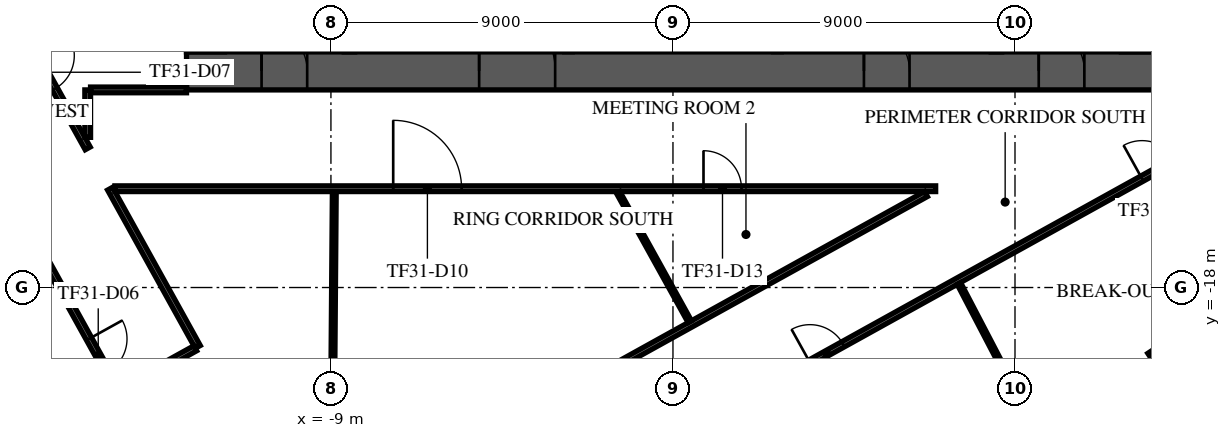
"""IFC4 building model, lengths in metres.
Left out: names, types, materials, properties, quantities, classifications, styles, units other than length and angle.
Written with IfcOpenShell. Run it as: python <this file> out.ifc"""

import sys

from ifc_helpers import new_model, si_unit, direction, frame, frame_2d, origin, origin_2d, place, context, subcontext, project, spatial, rectangle, extrude, element, fill, save


model = new_model("IFC4")
c1 = context("Model", 3, precision=1e-05, world=origin(), true_north=direction((0.0, 1.0)))
c2 = subcontext(c1, "Body", "Model", "MODEL_VIEW")
j1 = project(units=[si_unit("LENGTHUNIT", "METRE"), si_unit("PLANEANGLEUNIT", "RADIAN")], contexts=[c1])
p1 = place(None, origin())
s1 = spatial("IfcSite", under=j1, at=p1, CompositionType="ELEMENT")
p2 = place(p1, origin())
s2 = spatial("IfcBuilding", under=s1, at=p2, CompositionType="ELEMENT")
p3 = place(p2, frame((0.0, 0.0, 139.7)))
s3 = spatial("IfcBuildingStorey", under=s2, at=p3, CompositionType="ELEMENT", Elevation=139.7)
p4 = place(p3, frame((13.258, -19.885, 0.0), z_axis=(0.0, 0.0, 1.0), x_axis=(0.832028680356, 0.55473261583, 0.0)))
e1 = element("IfcColumn", 1, at=p4, inside=s3, PredefinedType="COLUMN", context=c2, shape_type="SweptSolid", body=[
    extrude(rectangle(XDim=1.1, YDim=1.1, at=origin_2d()), origin(), (0.0, 0.0, 1.0), 4.0),
])
p5 = place(p3, frame((-12.8, -12.3, 0.0), z_axis=(0.0, 0.0, 1.0), x_axis=(1.0, 0.0, 0.0)))
e2 = element("IfcWall", 2, at=p5, inside=s3, PredefinedType="SHEAR", context=c2, shape_type="SweptSolid", body=[
    extrude(rectangle(XDim=25.6, YDim=1.0, at=frame_2d((12.8, 0.0))), origin(), (0.0, 0.0, 1.0), 3.6),
])
p6 = place(p5, frame((7.7, 0.0, 0.0)))
e3 = element("IfcOpeningElement", 3, at=p6, cuts=e2, PredefinedType="OPENING", context=c2, shape_type="SweptSolid", body=[
    extrude(rectangle(XDim=2.0, YDim=2.1, at=frame_2d((1.0, 1.05))), frame((0.0, 0.51, 0.0), z_axis=(0.0, -1.0, 0.0), x_axis=(1.0, 0.0, 0.0)), (0.0, 0.0, 1.0), 1.02),
])
p7 = place(p5, frame((17.825, 0.0, 0.0)))
e4 = element("IfcOpeningElement", 4, at=p7, cuts=e2, PredefinedType="OPENING", context=c2, shape_type="SweptSolid", body=[
    extrude(rectangle(XDim=1.2, YDim=2.1, at=frame_2d((0.6, 1.05))), frame((0.0, 0.51, 0.0), z_axis=(0.0, -1.0, 0.0), x_axis=(1.0, 0.0, 0.0)), (0.0, 0.0, 1.0), 1.02),
])
p8 = place(p5, frame((1.975, 0.0, 0.0)))
e5 = element("IfcOpeningElement", 5, at=p8, cuts=e2, PredefinedType="OPENING", context=c2, shape_type="SweptSolid", body=[
    extrude(rectangle(XDim=1.2, YDim=2.1, at=frame_2d((0.6, 1.05))), frame((0.0, 0.51, 0.0), z_axis=(0.0, -1.0, 0.0), x_axis=(1.0, 0.0, 0.0)), (0.0, 0.0, 1.0), 1.02),
])
p9 = place(p5, frame((22.425, 0.0, 0.0)))
e6 = element("IfcOpeningElement", 6, at=p9, cuts=e2, PredefinedType="OPENING", context=c2, shape_type="SweptSolid", body=[
    extrude(rectangle(XDim=1.2, YDim=2.1, at=frame_2d((0.6, 1.05))), frame((0.0, 0.51, 0.0), z_axis=(0.0, -1.0, 0.0), x_axis=(1.0, 0.0, 0.0)), (0.0, 0.0, 1.0), 1.02),
])
p10 = place(p3, frame((-36.291, 4.209, 0.0), z_axis=(0.0, 0.0, 1.0), x_axis=(0.484810659622, -0.874619131003, 0.0)))
e7 = element("IfcWall", 7, at=p10, inside=s3, PredefinedType="STANDARD", context=c2, shape_type="SweptSolid", body=[
    extrude(rectangle(XDim=42.552, YDim=0.6, at=frame_2d((21.276, 0.0))), origin(), (0.0, 0.0, 1.0), 3.6),
])
p11 = place(p10, frame((1.178, 0.0, 0.9)))
e8 = element("IfcOpeningElement", 8, at=p11, cuts=e7, PredefinedType="OPENING", context=c2, shape_type="SweptSolid", body=[
    extrude(rectangle(XDim=1.8, YDim=2.1, at=frame_2d((0.9, 1.05))), frame((0.0, 0.31, 0.0), z_axis=(0.0, -1.0, 0.0), x_axis=(1.0, 0.0, 0.0)), (0.0, 0.0, 1.0), 0.62),
])
p12 = place(p10, frame((5.396, 0.0, 0.9)))
e9 = element("IfcOpeningElement", 9, at=p12, cuts=e7, PredefinedType="OPENING", context=c2, shape_type="SweptSolid", body=[
    extrude(rectangle(XDim=1.8, YDim=2.1, at=frame_2d((0.9, 1.05))), frame((0.0, 0.31, 0.0), z_axis=(0.0, -1.0, 0.0), x_axis=(1.0, 0.0, 0.0)), (0.0, 0.0, 1.0), 0.62),
])
p13 = place(p10, frame((13.956, 0.0, 0.9)))
e10 = element("IfcOpeningElement", 10, at=p13, cuts=e7, PredefinedType="OPENING", context=c2, shape_type="SweptSolid", body=[
    extrude(rectangle(XDim=1.8, YDim=2.1, at=frame_2d((0.9, 1.05))), frame((0.0, 0.31, 0.0), z_axis=(0.0, -1.0, 0.0), x_axis=(1.0, 0.0, 0.0)), (0.0, 0.0, 1.0), 0.62),
])
p14 = place(p10, frame((18.236, 0.0, 0.9)))
e11 = element("IfcOpeningElement", 11, at=p14, cuts=e7, PredefinedType="OPENING", context=c2, shape_type="SweptSolid", body=[
    extrude(rectangle(XDim=1.8, YDim=2.1, at=frame_2d((0.9, 1.05))), frame((0.0, 0.31, 0.0), z_axis=(0.0, -1.0, 0.0), x_axis=(1.0, 0.0, 0.0)), (0.0, 0.0, 1.0), 0.62),
])
p15 = place(p10, frame((22.516, 0.0, 0.9)))
e12 = element("IfcOpeningElement", 12, at=p15, cuts=e7, PredefinedType="OPENING", context=c2, shape_type="SweptSolid", body=[
    extrude(rectangle(XDim=1.8, YDim=2.1, at=frame_2d((0.9, 1.05))), frame((0.0, 0.31, 0.0), z_axis=(0.0, -1.0, 0.0), x_axis=(1.0, 0.0, 0.0)), (0.0, 0.0, 1.0), 0.62),
])
p16 = place(p10, frame((26.796, 0.0, 0.9)))
e13 = element("IfcOpeningElement", 13, at=p16, cuts=e7, PredefinedType="OPENING", context=c2, shape_type="SweptSolid", body=[
    extrude(rectangle(XDim=1.8, YDim=2.1, at=frame_2d((0.9, 1.05))), frame((0.0, 0.31, 0.0), z_axis=(0.0, -1.0, 0.0), x_axis=(1.0, 0.0, 0.0)), (0.0, 0.0, 1.0), 0.62),
])
p17 = place(p10, frame((31.076, 0.0, 0.9)))
e14 = element("IfcOpeningElement", 14, at=p17, cuts=e7, PredefinedType="OPENING", context=c2, shape_type="SweptSolid", body=[
    extrude(rectangle(XDim=1.8, YDim=2.1, at=frame_2d((0.9, 1.05))), frame((0.0, 0.31, 0.0), z_axis=(0.0, -1.0, 0.0), x_axis=(1.0, 0.0, 0.0)), (0.0, 0.0, 1.0), 0.62),
])
p18 = place(p10, frame((35.356, 0.0, 0.9)))
e15 = element("IfcOpeningElement", 15, at=p18, cuts=e7, PredefinedType="OPENING", context=c2, shape_type="SweptSolid", body=[
    extrude(rectangle(XDim=1.8, YDim=2.1, at=frame_2d((0.9, 1.05))), frame((0.0, 0.31, 0.0), z_axis=(0.0, -1.0, 0.0), x_axis=(1.0, 0.0, 0.0)), (0.0, 0.0, 1.0), 0.62),
])
p19 = place(p10, frame((39.573, 0.0, 0.9)))
e16 = element("IfcOpeningElement", 16, at=p19, cuts=e7, PredefinedType="OPENING", context=c2, shape_type="SweptSolid", body=[
    extrude(rectangle(XDim=1.8, YDim=2.1, at=frame_2d((0.9, 1.05))), frame((0.0, 0.31, 0.0), z_axis=(0.0, -1.0, 0.0), x_axis=(1.0, 0.0, 0.0)), (0.0, 0.0, 1.0), 0.62),
])
p20 = place(p3, frame((-9.103, -34.888, 0.0), z_axis=(0.0, 0.0, 1.0), x_axis=(0.874618897425, 0.484811081007, 0.0)))
e17 = element("IfcWall", 17, at=p20, inside=s3, PredefinedType="STANDARD", context=c2, shape_type="SweptSolid", body=[
    extrude(rectangle(XDim=49.751, YDim=0.6, at=frame_2d((24.876, 0.0))), origin(), (0.0, 0.0, 1.0), 3.6),
])
p21 = place(p20, frame((1.161, 0.0, 0.9)))
e18 = element("IfcOpeningElement", 18, at=p21, cuts=e17, PredefinedType="OPENING", context=c2, shape_type="SweptSolid", body=[
    extrude(rectangle(XDim=2.1, YDim=2.1, at=frame_2d((1.05, 1.05))), frame((0.0, 0.31, 0.0), z_axis=(0.0, -1.0, 0.0), x_axis=(1.0, 0.0, 0.0)), (0.0, 0.0, 1.0), 0.62),
])
p22 = place(p20, frame((5.644, 0.0, 0.9)))
e19 = element("IfcOpeningElement", 19, at=p22, cuts=e17, PredefinedType="OPENING", context=c2, shape_type="SweptSolid", body=[
    extrude(rectangle(XDim=2.1, YDim=2.1, at=frame_2d((1.05, 1.05))), frame((0.0, 0.31, 0.0), z_axis=(0.0, -1.0, 0.0), x_axis=(1.0, 0.0, 0.0)), (0.0, 0.0, 1.0), 0.62),
])
p23 = place(p20, frame((10.189, 0.0, 0.9)))
e20 = element("IfcOpeningElement", 20, at=p23, cuts=e17, PredefinedType="OPENING", context=c2, shape_type="SweptSolid", body=[
    extrude(rectangle(XDim=2.1, YDim=2.1, at=frame_2d((1.05, 1.05))), frame((0.0, 0.31, 0.0), z_axis=(0.0, -1.0, 0.0), x_axis=(1.0, 0.0, 0.0)), (0.0, 0.0, 1.0), 0.62),
])
p24 = place(p20, frame((14.735, 0.0, 0.9)))
e21 = element("IfcOpeningElement", 21, at=p24, cuts=e17, PredefinedType="OPENING", context=c2, shape_type="SweptSolid", body=[
    extrude(rectangle(XDim=2.1, YDim=2.1, at=frame_2d((1.05, 1.05))), frame((0.0, 0.31, 0.0), z_axis=(0.0, -1.0, 0.0), x_axis=(1.0, 0.0, 0.0)), (0.0, 0.0, 1.0), 0.62),
])
p25 = place(p20, frame((19.28, 0.0, 0.9)))
e22 = element("IfcOpeningElement", 22, at=p25, cuts=e17, PredefinedType="OPENING", context=c2, shape_type="SweptSolid", body=[
    extrude(rectangle(XDim=2.1, YDim=2.1, at=frame_2d((1.05, 1.05))), frame((0.0, 0.31, 0.0), z_axis=(0.0, -1.0, 0.0), x_axis=(1.0, 0.0, 0.0)), (0.0, 0.0, 1.0), 0.62),
])
p26 = place(p20, frame((23.826, 0.0, 0.9)))
e23 = element("IfcOpeningElement", 23, at=p26, cuts=e17, PredefinedType="OPENING", context=c2, shape_type="SweptSolid", body=[
    extrude(rectangle(XDim=2.1, YDim=2.1, at=frame_2d((1.05, 1.05))), frame((0.0, 0.31, 0.0), z_axis=(0.0, -1.0, 0.0), x_axis=(1.0, 0.0, 0.0)), (0.0, 0.0, 1.0), 0.62),
])
p27 = place(p20, frame((28.371, 0.0, 0.9)))
e24 = element("IfcOpeningElement", 24, at=p27, cuts=e17, PredefinedType="OPENING", context=c2, shape_type="SweptSolid", body=[
    extrude(rectangle(XDim=2.1, YDim=2.1, at=frame_2d((1.05, 1.05))), frame((0.0, 0.31, 0.0), z_axis=(0.0, -1.0, 0.0), x_axis=(1.0, 0.0, 0.0)), (0.0, 0.0, 1.0), 0.62),
])
p28 = place(p20, frame((32.917, 0.0, 0.9)))
e25 = element("IfcOpeningElement", 25, at=p28, cuts=e17, PredefinedType="OPENING", context=c2, shape_type="SweptSolid", body=[
    extrude(rectangle(XDim=2.1, YDim=2.1, at=frame_2d((1.05, 1.05))), frame((0.0, 0.31, 0.0), z_axis=(0.0, -1.0, 0.0), x_axis=(1.0, 0.0, 0.0)), (0.0, 0.0, 1.0), 0.62),
])
p29 = place(p20, frame((37.462, 0.0, 0.9)))
e26 = element("IfcOpeningElement", 26, at=p29, cuts=e17, PredefinedType="OPENING", context=c2, shape_type="SweptSolid", body=[
    extrude(rectangle(XDim=2.1, YDim=2.1, at=frame_2d((1.05, 1.05))), frame((0.0, 0.31, 0.0), z_axis=(0.0, -1.0, 0.0), x_axis=(1.0, 0.0, 0.0)), (0.0, 0.0, 1.0), 0.62),
])
p30 = place(p20, frame((42.008, 0.0, 0.9)))
e27 = element("IfcOpeningElement", 27, at=p30, cuts=e17, PredefinedType="OPENING", context=c2, shape_type="SweptSolid", body=[
    extrude(rectangle(XDim=2.1, YDim=2.1, at=frame_2d((1.05, 1.05))), frame((0.0, 0.31, 0.0), z_axis=(0.0, -1.0, 0.0), x_axis=(1.0, 0.0, 0.0)), (0.0, 0.0, 1.0), 0.62),
])
p31 = place(p20, frame((46.491, 0.0, 0.9)))
e28 = element("IfcOpeningElement", 28, at=p31, cuts=e17, PredefinedType="OPENING", context=c2, shape_type="SweptSolid", body=[
    extrude(rectangle(XDim=2.1, YDim=2.1, at=frame_2d((1.05, 1.05))), frame((0.0, 0.31, 0.0), z_axis=(0.0, -1.0, 0.0), x_axis=(1.0, 0.0, 0.0)), (0.0, 0.0, 1.0), 0.62),
])
p32 = place(p3, frame((-25.279, -1.467, 0.0), z_axis=(0.0, 0.0, 1.0), x_axis=(0.484803020703, -0.874623365294, 0.0)))
e29 = element("IfcWall", 29, at=p32, inside=s3, PredefinedType="PARTITIONING", context=c2, shape_type="SweptSolid", body=[
    extrude(rectangle(XDim=22.02, YDim=0.15, at=frame_2d((11.01, 0.0))), origin(), (0.0, 0.0, 1.0), 3.15),
])
p33 = place(p32, frame((6.3, 0.0, 0.0)))
e30 = element("IfcOpeningElement", 30, at=p33, cuts=e29, PredefinedType="OPENING", context=c2, shape_type="SweptSolid", body=[
    extrude(rectangle(XDim=1.8, YDim=2.1, at=frame_2d((0.9, 1.05))), frame((0.0, 0.085, 0.0), z_axis=(0.0, -1.0, 0.0), x_axis=(1.0, 0.0, 0.0)), (0.0, 0.0, 1.0), 0.17),
])
p34 = place(p32, frame((9.948, 0.0, 0.0)))
e31 = element("IfcOpeningElement", 31, at=p34, cuts=e29, PredefinedType="OPENING", context=c2, shape_type="SweptSolid", body=[
    extrude(rectangle(XDim=1.8, YDim=2.1, at=frame_2d((0.9, 1.05))), frame((0.0, 0.085, 0.0), z_axis=(0.0, -1.0, 0.0), x_axis=(1.0, 0.0, 0.0)), (0.0, 0.0, 1.0), 0.17),
])
p35 = place(p32, frame((20.448, 0.0, 0.0)))
e32 = element("IfcOpeningElement", 32, at=p35, cuts=e29, PredefinedType="OPENING", context=c2, shape_type="SweptSolid", body=[
    extrude(rectangle(XDim=1.0, YDim=2.1, at=frame_2d((0.5, 1.05))), frame((0.0, 0.085, 0.0), z_axis=(0.0, -1.0, 0.0), x_axis=(1.0, 0.0, 0.0)), (0.0, 0.0, 1.0), 0.17),
])
p36 = place(p3, frame((-18.959, -7.918, 0.0), z_axis=(0.0, 0.0, 1.0), x_axis=(0.484857684507, -0.874593062958, 0.0)))
e33 = element("IfcWall", 33, at=p36, inside=s3, PredefinedType="PARTITIONING", context=c2, shape_type="SweptSolid", body=[
    extrude(rectangle(XDim=7.341, YDim=0.15, at=frame_2d((3.67, 0.0))), origin(), (0.0, 0.0, 1.0), 3.15),
])
p37 = place(p36, frame((4.55, 0.0, 0.0)))
e34 = element("IfcOpeningElement", 34, at=p37, cuts=e33, PredefinedType="OPENING", context=c2, shape_type="SweptSolid", body=[
    extrude(rectangle(XDim=1.0, YDim=2.1, at=frame_2d((0.5, 1.05))), frame((0.0, 0.085, 0.0), z_axis=(0.0, -1.0, 0.0), x_axis=(1.0, 0.0, 0.0)), (0.0, 0.0, 1.0), 0.17),
])
p38 = place(p3, frame((-15.4, -14.048, 0.0), z_axis=(0.0, 0.0, 1.0), x_axis=(0.0, 1.0, 0.0)))
e35 = element("IfcWall", 35, at=p38, inside=s3, PredefinedType="PARTITIONING", context=c2, shape_type="SweptSolid", body=[
    extrude(rectangle(XDim=1.248, YDim=0.15, at=frame_2d((0.624, 0.0))), origin(), (0.0, 0.0, 1.0), 3.15),
])
p39 = place(p3, frame((-15.325, -12.8, 0.0), z_axis=(0.0, 0.0, 1.0), x_axis=(1.0, 0.0, 0.0)))
e36 = element("IfcWall", 36, at=p39, inside=s3, PredefinedType="PARTITIONING", context=c2, shape_type="SweptSolid", body=[
    extrude(rectangle(XDim=2.525, YDim=0.15, at=frame_2d((1.262, 0.0))), origin(), (0.0, 0.0, 1.0), 3.03),
])
p40 = place(p3, frame((-14.811, -15.4, 0.0), z_axis=(0.0, 0.0, 1.0), x_axis=(0.484728084089, -0.874664898401, 0.0)))
e37 = element("IfcWall", 37, at=p40, inside=s3, PredefinedType="PARTITIONING", context=c2, shape_type="SweptSolid", body=[
    extrude(rectangle(XDim=4.76, YDim=0.15, at=frame_2d((2.38, 0.0))), origin(), (0.0, 0.0, 1.0), 3.15),
])
p41 = place(p3, frame((-14.684, -15.4, 0.0), z_axis=(0.0, 0.0, 1.0), x_axis=(1.0, 0.0, 0.0)))
e38 = element("IfcWall", 38, at=p41, inside=s3, PredefinedType="PARTITIONING", context=c2, shape_type="SweptSolid", body=[
    extrude(rectangle(XDim=21.596, YDim=0.15, at=frame_2d((10.798, 0.0))), origin(), (0.0, 0.0, 1.0), 3.15),
])
p42 = place(p41, frame((7.322, 0.0, 0.0)))
e39 = element("IfcOpeningElement", 39, at=p42, cuts=e38, PredefinedType="OPENING", context=c2, shape_type="SweptSolid", body=[
    extrude(rectangle(XDim=1.8, YDim=2.1, at=frame_2d((0.9, 1.05))), frame((0.0, 0.085, 0.0), z_axis=(0.0, -1.0, 0.0), x_axis=(1.0, 0.0, 0.0)), (0.0, 0.0, 1.0), 0.17),
])
p43 = place(p41, frame((15.487, 0.0, 0.0)))
e40 = element("IfcOpeningElement", 40, at=p43, cuts=e38, PredefinedType="OPENING", context=c2, shape_type="SweptSolid", body=[
    extrude(rectangle(XDim=1.0, YDim=2.1, at=frame_2d((0.5, 1.05))), frame((0.0, 0.085, 0.0), z_axis=(0.0, -1.0, 0.0), x_axis=(1.0, 0.0, 0.0)), (0.0, 0.0, 1.0), 0.17),
])
p44 = place(p3, frame((-14.537, -20.69, 0.0), z_axis=(0.0, 0.0, 1.0), x_axis=(0.874699347934, 0.48466591661, 0.0)))
e41 = element("IfcWall", 41, at=p44, inside=s3, PredefinedType="PARTITIONING", context=c2, shape_type="SweptSolid", body=[
    extrude(rectangle(XDim=2.25, YDim=0.15, at=frame_2d((1.125, 0.0))), origin(), (0.0, 0.0, 1.0), 3.15),
])
p45 = place(p3, frame((-5.714, -22.399, 0.0), z_axis=(0.0, 0.0, 1.0), x_axis=(0.874614395079, 0.484819203334, 0.0)))
e42 = element("IfcWall", 42, at=p45, inside=s3, PredefinedType="PARTITIONING", context=c2, shape_type="SweptSolid", body=[
    extrude(rectangle(XDim=14.146, YDim=0.15, at=frame_2d((7.073, 0.0))), origin(), (0.0, 0.0, 1.0), 3.15),
])
p46 = place(p45, frame((3.05, 0.0, 0.0)))
e43 = element("IfcOpeningElement", 43, at=p46, cuts=e42, PredefinedType="OPENING", context=c2, shape_type="SweptSolid", body=[
    extrude(rectangle(XDim=1.0, YDim=2.1, at=frame_2d((0.5, 1.05))), frame((0.0, 0.085, 0.0), z_axis=(0.0, -1.0, 0.0), x_axis=(1.0, 0.0, 0.0)), (0.0, 0.0, 1.0), 0.17),
])
p47 = place(p3, frame((-4.484, -24.462, 0.0), z_axis=(0.0, 0.0, 1.0), x_axis=(0.874618059696, 0.484812592301, 0.0)))
e44 = element("IfcWall", 44, at=p47, inside=s3, PredefinedType="PARTITIONING", context=c2, shape_type="SweptSolid", body=[
    extrude(rectangle(XDim=31.638, YDim=0.15, at=frame_2d((15.819, 0.0))), origin(), (0.0, 0.0, 1.0), 3.15),
])
p48 = place(p47, frame((9.25, 0.0, 0.0)))
e45 = element("IfcOpeningElement", 45, at=p48, cuts=e44, PredefinedType="OPENING", context=c2, shape_type="SweptSolid", body=[
    extrude(rectangle(XDim=1.0, YDim=2.1, at=frame_2d((0.5, 1.05))), frame((0.0, 0.085, 0.0), z_axis=(0.0, -1.0, 0.0), x_axis=(1.0, 0.0, 0.0)), (0.0, 0.0, 1.0), 0.17),
])
p49 = place(p47, frame((19.239, 0.0, 0.0)))
e46 = element("IfcOpeningElement", 46, at=p49, cuts=e44, PredefinedType="OPENING", context=c2, shape_type="SweptSolid", body=[
    extrude(rectangle(XDim=1.0, YDim=2.1, at=frame_2d((0.5, 1.05))), frame((0.0, 0.085, 0.0), z_axis=(0.0, -1.0, 0.0), x_axis=(1.0, 0.0, 0.0)), (0.0, 0.0, 1.0), 0.17),
])
p50 = place(p47, frame((24.772, 0.0, 0.0)))
e47 = element("IfcOpeningElement", 47, at=p50, cuts=e44, PredefinedType="OPENING", context=c2, shape_type="SweptSolid", body=[
    extrude(rectangle(XDim=1.0, YDim=2.1, at=frame_2d((0.5, 1.05))), frame((0.0, 0.085, 0.0), z_axis=(0.0, -1.0, 0.0), x_axis=(1.0, 0.0, 0.0)), (0.0, 0.0, 1.0), 0.17),
])
p51 = place(p3, frame((-9.023, -29.637, 0.0), z_axis=(0.0, 0.0, 1.0), x_axis=(0.007843639619, 0.999969238186, 0.0)))
e48 = element("IfcWall", 48, at=p51, inside=s3, PredefinedType="PARTITIONING", context=c2, shape_type="SweptSolid", body=[
    extrude(rectangle(XDim=14.162, YDim=0.1, at=frame_2d((7.081, 0.0))), origin(), (0.0, 0.0, 1.0), 3.15),
])
p52 = place(p3, frame((-1.441, -15.499, 0.0), z_axis=(0.0, 0.0, 1.0), x_axis=(0.484661708709, -0.874701679495, 0.0)))
e49 = element("IfcWall", 49, at=p52, inside=s3, PredefinedType="PARTITIONING", context=c2, shape_type="SweptSolid", body=[
    extrude(rectangle(XDim=3.888, YDim=0.1, at=frame_2d((1.944, 0.0))), origin(), (0.0, 0.0, 1.0), 3.6),
])
p53 = place(p3, frame((7.524, -17.893, 0.0), z_axis=(0.0, 0.0, 1.0), x_axis=(0.462569855846, -0.886582837902, 0.0)))
e50 = element("IfcWall", 50, at=p53, inside=s3, PredefinedType="PARTITIONING", context=c2, shape_type="SweptSolid", body=[
    extrude(rectangle(XDim=6.503, YDim=0.1, at=frame_2d((3.251, 0.0))), origin(), (0.0, 0.0, 1.0), 3.15),
])
p54 = place(p6, origin())
e51 = element("IfcDoor", 51, at=p54, inside=s3, OperationType="SINGLE_SWING_LEFT", PredefinedType="DOOR", context=c2, shape_type="SweptSolid", body=[
    extrude(rectangle(XDim=2.0, YDim=2.1, at=frame_2d((1.0, 1.05))), frame((0.0, 0.025, 0.0), z_axis=(0.0, -1.0, 0.0), x_axis=(1.0, 0.0, 0.0)), (0.0, 0.0, 1.0), 0.05),
])
fill(e3, e51)
p55 = place(p7, origin())
e52 = element("IfcDoor", 52, at=p55, inside=s3, OperationType="SINGLE_SWING_LEFT", PredefinedType="DOOR", context=c2, shape_type="SweptSolid", body=[
    extrude(rectangle(XDim=1.2, YDim=2.1, at=frame_2d((0.6, 1.05))), frame((0.0, 0.025, 0.0), z_axis=(0.0, -1.0, 0.0), x_axis=(1.0, 0.0, 0.0)), (0.0, 0.0, 1.0), 0.05),
])
fill(e4, e52)
p56 = place(p8, origin())
e53 = element("IfcDoor", 53, at=p56, inside=s3, OperationType="SINGLE_SWING_LEFT", PredefinedType="DOOR", context=c2, shape_type="SweptSolid", body=[
    extrude(rectangle(XDim=1.2, YDim=2.1, at=frame_2d((0.6, 1.05))), frame((0.0, 0.025, 0.0), z_axis=(0.0, -1.0, 0.0), x_axis=(1.0, 0.0, 0.0)), (0.0, 0.0, 1.0), 0.05),
])
fill(e5, e53)
p57 = place(p9, origin())
e54 = element("IfcDoor", 54, at=p57, inside=s3, OperationType="SINGLE_SWING_LEFT", PredefinedType="DOOR", context=c2, shape_type="SweptSolid", body=[
    extrude(rectangle(XDim=1.2, YDim=2.1, at=frame_2d((0.6, 1.05))), frame((0.0, 0.025, 0.0), z_axis=(0.0, -1.0, 0.0), x_axis=(1.0, 0.0, 0.0)), (0.0, 0.0, 1.0), 0.05),
])
fill(e6, e54)
p58 = place(p35, frame((1.0, 0.0, 0.0), z_axis=(0.0, 0.0, 1.0), x_axis=(-1.0, 0.0, 0.0)))
e55 = element("IfcDoor", 55, at=p58, inside=s3, OperationType="SINGLE_SWING_LEFT", PredefinedType="DOOR", context=c2, shape_type="SweptSolid", body=[
    extrude(rectangle(XDim=1.0, YDim=2.1, at=frame_2d((0.5, 1.05))), frame((0.0, 0.025, 0.0), z_axis=(0.0, -1.0, 0.0), x_axis=(1.0, 0.0, 0.0)), (0.0, 0.0, 1.0), 0.05),
])
fill(e32, e55)
p59 = place(p37, origin())
e56 = element("IfcDoor", 56, at=p59, inside=s3, OperationType="SINGLE_SWING_LEFT", PredefinedType="DOOR", context=c2, shape_type="SweptSolid", body=[
    extrude(rectangle(XDim=1.0, YDim=2.1, at=frame_2d((0.5, 1.05))), frame((0.0, 0.025, 0.0), z_axis=(0.0, -1.0, 0.0), x_axis=(1.0, 0.0, 0.0)), (0.0, 0.0, 1.0), 0.05),
])
fill(e34, e56)
p60 = place(p42, frame((1.8, 0.0, 0.0), z_axis=(0.0, 0.0, 1.0), x_axis=(-1.0, 0.0, 0.0)))
e57 = element("IfcDoor", 57, at=p60, inside=s3, OperationType="DOUBLE_DOOR_SINGLE_SWING", PredefinedType="DOOR", context=c2, shape_type="SweptSolid", body=[
    extrude(rectangle(XDim=1.8, YDim=2.1, at=frame_2d((0.9, 1.05))), frame((0.0, 0.025, 0.0), z_axis=(0.0, -1.0, 0.0), x_axis=(1.0, 0.0, 0.0)), (0.0, 0.0, 1.0), 0.05),
])
fill(e39, e57)
p61 = place(p43, frame((1.0, 0.0, 0.0), z_axis=(0.0, 0.0, 1.0), x_axis=(-1.0, 0.0, 0.0)))
e58 = element("IfcDoor", 58, at=p61, inside=s3, OperationType="SINGLE_SWING_LEFT", PredefinedType="DOOR", context=c2, shape_type="SweptSolid", body=[
    extrude(rectangle(XDim=1.0, YDim=2.1, at=frame_2d((0.5, 1.05))), frame((0.0, 0.025, 0.0), z_axis=(0.0, -1.0, 0.0), x_axis=(1.0, 0.0, 0.0)), (0.0, 0.0, 1.0), 0.05),
])
fill(e40, e58)
p62 = place(p48, frame((1.0, 0.0, 0.0), z_axis=(0.0, 0.0, 1.0), x_axis=(-1.0, 0.0, 0.0)))
e59 = element("IfcDoor", 59, at=p62, inside=s3, OperationType="SINGLE_SWING_RIGHT", PredefinedType="DOOR", context=c2, shape_type="SweptSolid", body=[
    extrude(rectangle(XDim=1.0, YDim=2.1, at=frame_2d((0.5, 1.05))), frame((0.0, 0.025, 0.0), z_axis=(0.0, -1.0, 0.0), x_axis=(1.0, 0.0, 0.0)), (0.0, 0.0, 1.0), 0.05),
])
fill(e45, e59)
p63 = place(p49, frame((1.0, 0.0, 0.0), z_axis=(0.0, 0.0, 1.0), x_axis=(-1.0, 0.0, 0.0)))
e60 = element("IfcDoor", 60, at=p63, inside=s3, OperationType="SINGLE_SWING_RIGHT", PredefinedType="DOOR", context=c2, shape_type="SweptSolid", body=[
    extrude(rectangle(XDim=1.0, YDim=2.1, at=frame_2d((0.5, 1.05))), frame((0.0, 0.025, 0.0), z_axis=(0.0, -1.0, 0.0), x_axis=(1.0, 0.0, 0.0)), (0.0, 0.0, 1.0), 0.05),
])
fill(e46, e60)
save(model, sys.argv[1])
